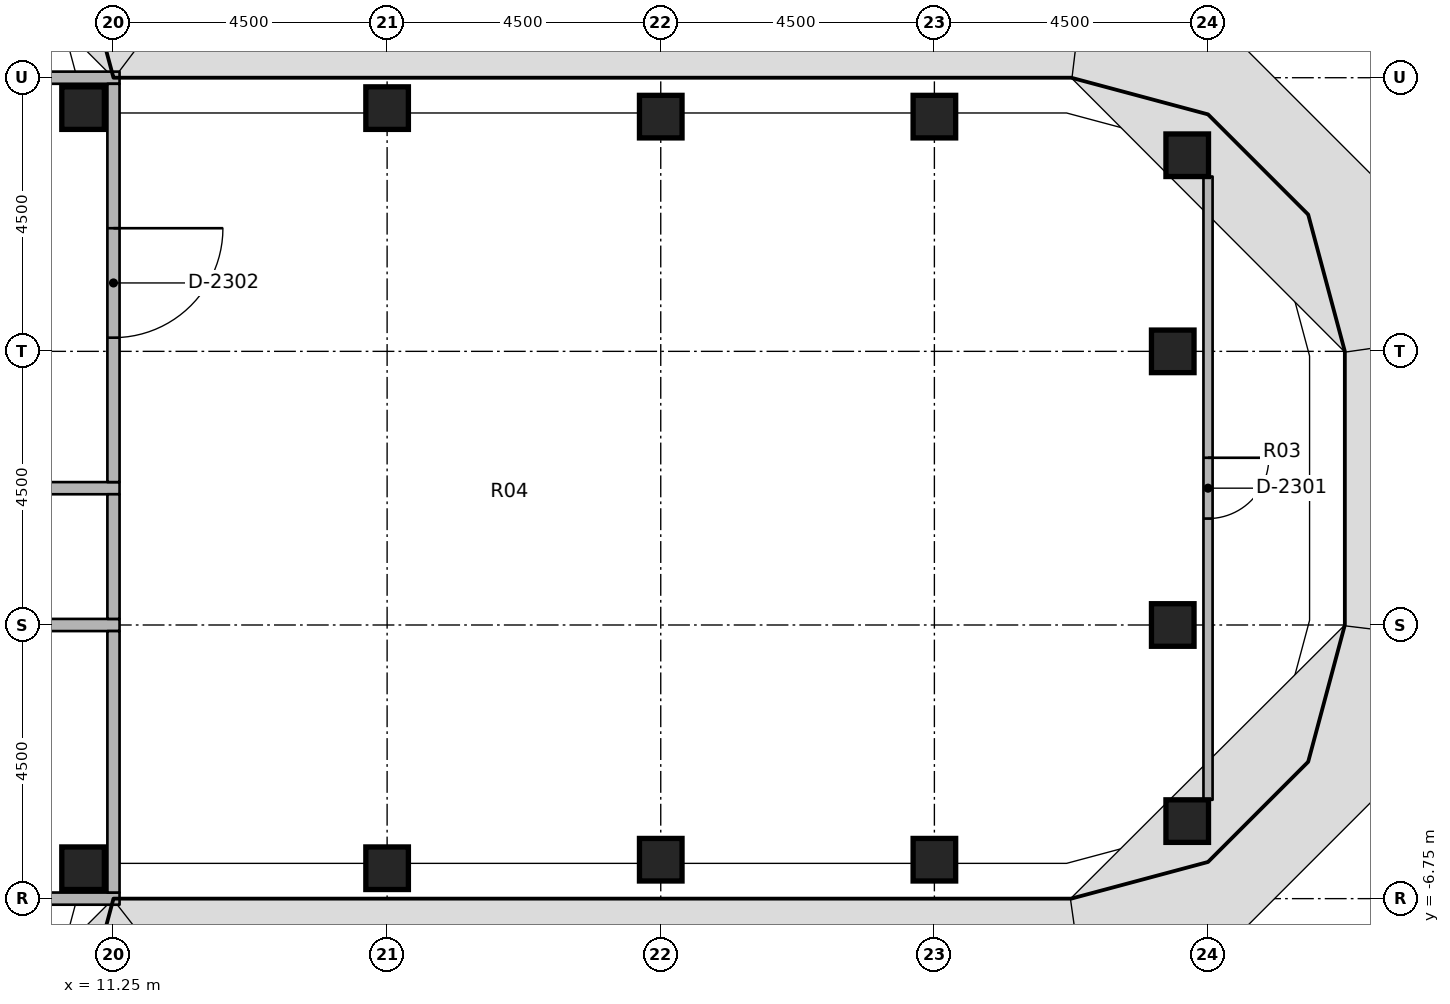
"""IFC4 building model, lengths in metres.
Left out: names, types, materials, properties, quantities, classifications, styles, units other than length and angle.
Written with IfcOpenShell. Run it as: python <this file> out.ifc"""

import sys

from ifc_helpers import new_model, si_unit, direction, frame, frame_2d, origin, origin_2d, place, context, subcontext, project, spatial, rectangle, extrude, element, fill, save


model = new_model("IFC4")
c1 = context("Model", 3, precision=1e-05, world=origin(), true_north=direction((0.0, 1.0)))
c2 = subcontext(c1, "Body", "Model", "MODEL_VIEW")
j1 = project(units=[si_unit("LENGTHUNIT", "METRE"), si_unit("PLANEANGLEUNIT", "RADIAN")], contexts=[c1])
p1 = place(None, origin())
s1 = spatial("IfcSite", under=j1, at=p1, CompositionType="ELEMENT")
p2 = place(p1, origin())
s2 = spatial("IfcBuilding", under=s1, at=p2, CompositionType="ELEMENT")
p3 = place(p2, frame((0.0, 0.0, 218.2)))
s3 = spatial("IfcBuildingStorey", under=s2, at=p3, CompositionType="ELEMENT", Elevation=218.2)
for number, where, z_axis, x_axis in (
    (1, (10.75, -6.25, 0.0), (0.0, 0.0, 1.0), (1.0, 0.0, 0.0)),
    (2, (10.75, 6.25, 0.0), (0.0, 0.0, 1.0), (1.0, 0.0, 0.0)),
    (3, (15.75, -6.25, 0.0), (0.0, 0.0, 1.0), (1.0, 0.0, 0.0)),
    (4, (15.75, 6.25, 0.0), (0.0, 0.0, 1.0), (1.0, 0.0, 0.0)),
    (5, (20.25, -6.11, 0.0), (0.0, 0.0, 1.0), (1.0, 0.0, 0.0)),
    (6, (20.25, 6.11, 0.0), (0.0, 0.0, 1.0), (1.0, 0.0, 0.0)),
    (7, (24.75, -6.11, 0.0), (0.0, 0.0, 1.0), (1.0, 0.0, 0.0)),
    (8, (24.75, 6.11, 0.0), (0.0, 0.0, 1.0), (1.0, 0.0, 0.0)),
    (9, (28.908, -5.475, 0.0), (0.0, 0.0, 1.0), (1.0, 0.0, 0.0)),
    (10, (28.67, -2.25, 0.0), (0.0, 0.0, 1.0), (1.0, 0.0, 0.0)),
    (11, (28.67, 2.25, 0.0), (0.0, 0.0, 1.0), (1.0, 0.0, 0.0)),
    (12, (28.908, 5.475, 0.0), (0.0, 0.0, 1.0), (1.0, 0.0, 0.0)),
):
    element("IfcColumn", number, at=place(p3, frame(where, z_axis=z_axis, x_axis=x_axis)), inside=s3, PredefinedType="COLUMN", context=c2, shape_type="SweptSolid", body=[
        extrude(rectangle(XDim=0.7, YDim=0.7, at=origin_2d()), origin(), (0.0, 0.0, 1.0), 3.65),
    ])
p4 = place(p3, frame((6.65, 0.0, 0.0), z_axis=(0.0, 0.0, 1.0), x_axis=(1.0, 0.0, 0.0)))
e13 = element("IfcWall", 13, at=p4, inside=s3, PredefinedType="PARTITIONING", context=c2, shape_type="SweptSolid", body=[
    extrude(rectangle(XDim=4.7, YDim=0.2, at=frame_2d((2.35, 0.0))), origin(), (0.0, 0.0, 1.0), 2.75),
])
p5 = place(p4, frame((1.85, 0.0, 0.0)))
e14 = element("IfcOpeningElement", 14, at=p5, cuts=e13, PredefinedType="OPENING", context=c2, shape_type="SweptSolid", body=[
    extrude(rectangle(XDim=1.0, YDim=2.1, at=frame_2d((0.5, 1.05))), frame((0.0, 0.11, 0.0), z_axis=(0.0, -1.0, 0.0), x_axis=(1.0, 0.0, 0.0)), (0.0, 0.0, 1.0), 0.22),
])
p6 = place(p3, frame((11.35, -2.25, 0.0), z_axis=(0.0, 0.0, 1.0), x_axis=(-1.0, 0.0, 0.0)))
e15 = element("IfcWall", 15, at=p6, inside=s3, PredefinedType="PARTITIONING", context=c2, shape_type="SweptSolid", body=[
    extrude(rectangle(XDim=4.7, YDim=0.2, at=frame_2d((2.35, 0.0))), origin(), (0.0, 0.0, 1.0), 2.75),
])
p7 = place(p6, frame((1.85, 0.0, 0.0)))
e16 = element("IfcOpeningElement", 16, at=p7, cuts=e15, PredefinedType="OPENING", context=c2, shape_type="SweptSolid", body=[
    extrude(rectangle(XDim=1.0, YDim=2.1, at=frame_2d((0.5, 1.05))), frame((0.0, 0.11, 0.0), z_axis=(0.0, -1.0, 0.0), x_axis=(1.0, 0.0, 0.0)), (0.0, 0.0, 1.0), 0.22),
])
p8 = place(p3, frame((11.25, -2.15, 0.0), z_axis=(0.0, 0.0, 1.0), x_axis=(0.0, 1.0, 0.0)))
e17 = element("IfcWall", 17, at=p8, inside=s3, PredefinedType="PARTITIONING", context=c2, shape_type="SweptSolid", body=[
    extrude(rectangle(XDim=2.05, YDim=0.2, at=frame_2d((1.025, 0.0))), origin(), (0.0, 0.0, 1.0), 2.75),
])
p9 = place(p3, frame((6.65, 6.75, 0.0), z_axis=(0.0, 0.0, 1.0), x_axis=(1.0, 0.0, 0.0)))
e18 = element("IfcWall", 18, at=p9, inside=s3, PredefinedType="PARTITIONING", context=c2, shape_type="SweptSolid", body=[
    extrude(rectangle(XDim=4.7, YDim=0.2, at=frame_2d((2.35, 0.0))), origin(), (0.0, 0.0, 1.0), 2.75),
])
p10 = place(p3, frame((11.25, 6.65, 0.0), z_axis=(0.0, 0.0, 1.0), x_axis=(0.0, -1.0, 0.0)))
e19 = element("IfcWall", 19, at=p10, inside=s3, PredefinedType="PARTITIONING", context=c2, shape_type="SweptSolid", body=[
    extrude(rectangle(XDim=6.55, YDim=0.2, at=frame_2d((3.275, 0.0))), origin(), (0.0, 0.0, 1.0), 2.75),
])
p11 = place(p10, frame((2.375, 0.0, 0.0)))
e20 = element("IfcOpeningElement", 20, at=p11, cuts=e19, PredefinedType="OPENING", context=c2, shape_type="SweptSolid", body=[
    extrude(rectangle(XDim=1.8, YDim=2.1, at=frame_2d((0.9, 1.05))), frame((0.0, 0.11, 0.0), z_axis=(0.0, -1.0, 0.0), x_axis=(1.0, 0.0, 0.0)), (0.0, 0.0, 1.0), 0.22),
])
p12 = place(p3, frame((6.65, -6.75, 0.0), z_axis=(0.0, 0.0, 1.0), x_axis=(1.0, 0.0, 0.0)))
e21 = element("IfcWall", 21, at=p12, inside=s3, PredefinedType="PARTITIONING", context=c2, shape_type="SweptSolid", body=[
    extrude(rectangle(XDim=4.7, YDim=0.2, at=frame_2d((2.35, 0.0))), origin(), (0.0, 0.0, 1.0), 2.75),
])
p13 = place(p3, frame((11.25, -6.65, 0.0), z_axis=(0.0, 0.0, 1.0), x_axis=(0.0, 1.0, 0.0)))
e22 = element("IfcWall", 22, at=p13, inside=s3, PredefinedType="PARTITIONING", context=c2, shape_type="SweptSolid", body=[
    extrude(rectangle(XDim=4.3, YDim=0.2, at=frame_2d((2.15, 0.0))), origin(), (0.0, 0.0, 1.0), 2.75),
])
p14 = place(p3, frame((29.25, 5.125, 0.0), z_axis=(0.0, 0.0, 1.0), x_axis=(0.0, -1.0, 0.0)))
e23 = element("IfcWall", 23, at=p14, inside=s3, PredefinedType="PARTITIONING", context=c2, shape_type="SweptSolid", body=[
    extrude(rectangle(XDim=10.25, YDim=0.15, at=frame_2d((5.125, 0.0))), origin(), (0.0, 0.0, 1.0), 2.75),
])
p15 = place(p14, frame((4.625, 0.0, 0.0)))
e24 = element("IfcOpeningElement", 24, at=p15, cuts=e23, PredefinedType="OPENING", context=c2, shape_type="SweptSolid", body=[
    extrude(rectangle(XDim=1.0, YDim=2.1, at=frame_2d((0.5, 1.05))), frame((0.0, 0.085, 0.0), z_axis=(0.0, -1.0, 0.0), x_axis=(1.0, 0.0, 0.0)), (0.0, 0.0, 1.0), 0.17),
])
p16 = place(p15, origin())
e25 = element("IfcDoor", 25, at=p16, inside=s3, OperationType="SINGLE_SWING_RIGHT", PredefinedType="DOOR", context=c2, shape_type="SweptSolid", body=[
    extrude(rectangle(XDim=1.0, YDim=2.1, at=frame_2d((0.5, 1.05))), frame((0.0, 0.025, 0.0), z_axis=(0.0, -1.0, 0.0), x_axis=(1.0, 0.0, 0.0)), (0.0, 0.0, 1.0), 0.05),
])
fill(e24, e25)
p17 = place(p11, origin())
e26 = element("IfcDoor", 26, at=p17, inside=s3, OperationType="DOUBLE_DOOR_SINGLE_SWING", PredefinedType="DOOR", context=c2, shape_type="SweptSolid", body=[
    extrude(rectangle(XDim=1.8, YDim=2.1, at=frame_2d((0.9, 1.05))), frame((0.0, 0.025, 0.0), z_axis=(0.0, -1.0, 0.0), x_axis=(1.0, 0.0, 0.0)), (0.0, 0.0, 1.0), 0.05),
])
fill(e20, e26)
save(model, sys.argv[1])
